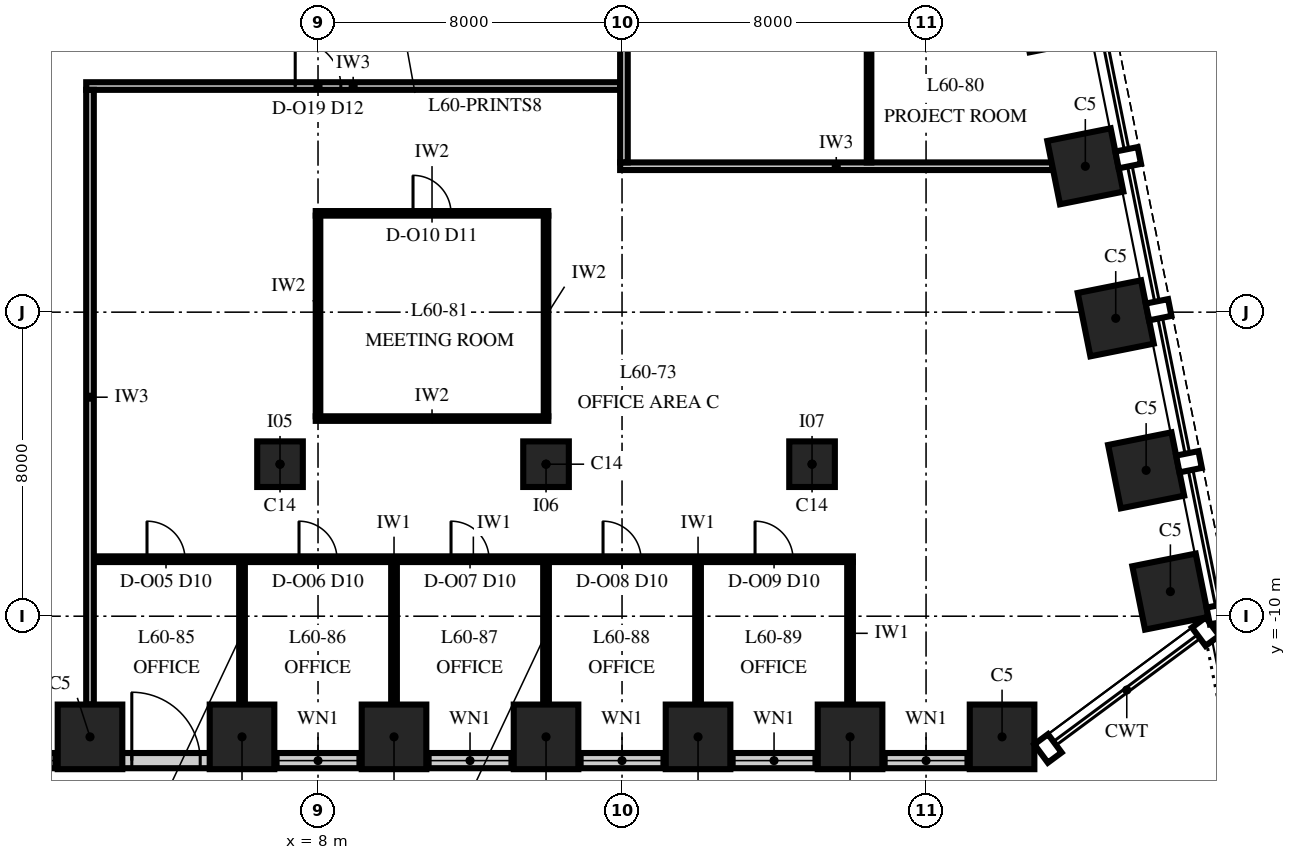
"""IFC4 building model, lengths in metres.
Left out: names, types, materials, properties, quantities, classifications, styles, units other than length and angle.
Written with IfcOpenShell. Run it as: python <this file> out.ifc"""

import sys

from ifc_helpers import new_model, si_unit, direction, frame, frame_2d, origin, origin_2d, place, context, subcontext, project, spatial, rectangle, extrude, element, fill, save


model = new_model("IFC4")
c1 = context("Model", 3, precision=1e-05, world=origin(), true_north=direction((0.0, 1.0)))
c2 = subcontext(c1, "Body", "Model", "MODEL_VIEW")
j1 = project(units=[si_unit("LENGTHUNIT", "METRE"), si_unit("PLANEANGLEUNIT", "RADIAN")], contexts=[c1])
p1 = place(None, origin())
s1 = spatial("IfcSite", under=j1, at=p1, CompositionType="ELEMENT")
p2 = place(p1, origin())
s2 = spatial("IfcBuilding", under=s1, at=p2, CompositionType="ELEMENT")
p3 = place(p2, frame((0.0, 0.0, 260.0)))
s3 = spatial("IfcBuildingStorey", under=s2, at=p3, CompositionType="ELEMENT", Elevation=260.0)
for number, where, z_axis, x_axis in (
    (1, (2.0, -13.175, -0.25), (0.0, 0.0, 1.0), (1.0, 0.0, 0.0)),
    (2, (6.0, -13.175, -0.25), (0.0, 0.0, 1.0), (1.0, 0.0, 0.0)),
    (3, (10.0, -13.175, -0.25), (0.0, 0.0, 1.0), (1.0, 0.0, 0.0)),
    (4, (14.0, -13.175, -0.25), (0.0, 0.0, 1.0), (1.0, 0.0, 0.0)),
    (5, (18.0, -13.175, -0.25), (0.0, 0.0, 1.0), (1.0, 0.0, 0.0)),
    (6, (22.0, -13.175, -0.25), (0.0, 0.0, 1.0), (1.0, 0.0, 0.0)),
    (7, (26.0, -13.175, -0.25), (0.0, 0.0, 1.0), (1.0, 0.0, 0.0)),
):
    element("IfcColumn", number, at=place(p3, frame(where, z_axis=z_axis, x_axis=x_axis)), inside=s3, PredefinedType="COLUMN", context=c2, shape_type="SweptSolid", body=[
        extrude(rectangle(XDim=1.7, YDim=1.7, at=origin_2d()), origin(), (0.0, 0.0, 1.0), 4.25),
    ])
for number, where, z_axis, x_axis in (
    (8, (30.429, -9.353, 0.0), (0.0, 0.0, 1.0), (-0.196, 0.981, 0.0)),
    (9, (29.791, -6.162, 0.0), (0.0, 0.0, 1.0), (-0.196, 0.981, 0.0)),
    (10, (28.991, -2.162, 0.0), (0.0, 0.0, 1.0), (-0.196, 0.981, 0.0)),
    (11, (28.191, 1.838, 0.0), (0.0, 0.0, 1.0), (-0.196, 0.981, 0.0)),
    (12, (27.391, 5.838, 0.0), (0.0, 0.0, 1.0), (-0.196, 0.981, 0.0)),
):
    element("IfcColumn", number, at=place(p3, frame(where, z_axis=z_axis, x_axis=x_axis)), inside=s3, PredefinedType="COLUMN", context=c2, shape_type="SweptSolid", body=[
        extrude(rectangle(XDim=1.7, YDim=1.7, at=origin_2d()), origin(), (0.0, 0.0, 1.0), 4.0),
    ])
for number, where, z_axis, x_axis in (
    (13, (7.0, -6.0, 0.0), (0.0, 0.0, 1.0), (1.0, 0.0, 0.0)),
    (14, (14.0, -6.0, 0.0), (0.0, 0.0, 1.0), (1.0, 0.0, 0.0)),
    (15, (21.0, -6.0, 0.0), (0.0, 0.0, 1.0), (1.0, 0.0, 0.0)),
):
    element("IfcColumn", number, at=place(p3, frame(where, z_axis=z_axis, x_axis=x_axis)), inside=s3, PredefinedType="COLUMN", context=c2, shape_type="SweptSolid", body=[
        extrude(rectangle(XDim=1.2, YDim=1.2, at=origin_2d()), origin(), (0.0, 0.0, 1.0), 4.0),
    ])
p4 = place(p3, frame((-26.0, -13.8, 0.0), z_axis=(0.0, 0.0, 1.0), x_axis=(1.0, 0.0, 0.0)))
e16 = element("IfcWall", 16, at=p4, inside=s3, PredefinedType="SOLIDWALL", context=c2, shape_type="SweptSolid", body=[
    extrude(rectangle(XDim=52.0, YDim=0.4, at=frame_2d((26.0, 0.0))), origin(), (0.0, 0.0, 1.0), 2.0),
])
p5 = place(p4, frame((0.95, 0.0, 0.8)))
e17 = element("IfcOpeningElement", 17, at=p5, cuts=e16, PredefinedType="OPENING", context=c2, shape_type="SweptSolid", body=[
    extrude(rectangle(XDim=2.1, YDim=1.15, at=frame_2d((1.05, 0.575))), frame((0.0, 0.215, 0.0), z_axis=(0.0, -1.0, 0.0), x_axis=(1.0, 0.0, 0.0)), (0.0, 0.0, 1.0), 0.43),
])
p6 = place(p4, frame((4.95, 0.0, 0.8)))
e18 = element("IfcOpeningElement", 18, at=p6, cuts=e16, PredefinedType="OPENING", context=c2, shape_type="SweptSolid", body=[
    extrude(rectangle(XDim=2.1, YDim=1.15, at=frame_2d((1.05, 0.575))), frame((0.0, 0.215, 0.0), z_axis=(0.0, -1.0, 0.0), x_axis=(1.0, 0.0, 0.0)), (0.0, 0.0, 1.0), 0.43),
])
p7 = place(p4, frame((8.95, 0.0, 0.8)))
e19 = element("IfcOpeningElement", 19, at=p7, cuts=e16, PredefinedType="OPENING", context=c2, shape_type="SweptSolid", body=[
    extrude(rectangle(XDim=2.1, YDim=1.15, at=frame_2d((1.05, 0.575))), frame((0.0, 0.215, 0.0), z_axis=(0.0, -1.0, 0.0), x_axis=(1.0, 0.0, 0.0)), (0.0, 0.0, 1.0), 0.43),
])
p8 = place(p4, frame((12.95, 0.0, 0.8)))
e20 = element("IfcOpeningElement", 20, at=p8, cuts=e16, PredefinedType="OPENING", context=c2, shape_type="SweptSolid", body=[
    extrude(rectangle(XDim=2.1, YDim=1.15, at=frame_2d((1.05, 0.575))), frame((0.0, 0.215, 0.0), z_axis=(0.0, -1.0, 0.0), x_axis=(1.0, 0.0, 0.0)), (0.0, 0.0, 1.0), 0.43),
])
p9 = place(p4, frame((16.95, 0.0, 0.8)))
e21 = element("IfcOpeningElement", 21, at=p9, cuts=e16, PredefinedType="OPENING", context=c2, shape_type="SweptSolid", body=[
    extrude(rectangle(XDim=2.1, YDim=1.15, at=frame_2d((1.05, 0.575))), frame((0.0, 0.215, 0.0), z_axis=(0.0, -1.0, 0.0), x_axis=(1.0, 0.0, 0.0)), (0.0, 0.0, 1.0), 0.43),
])
p10 = place(p4, frame((21.1, 0.0, 0.0)))
e22 = element("IfcOpeningElement", 22, at=p10, cuts=e16, PredefinedType="OPENING", context=c2, shape_type="SweptSolid", body=[
    extrude(rectangle(XDim=1.8, YDim=2.0, at=frame_2d((0.9, 1.0))), frame((0.0, 0.215, 0.0), z_axis=(0.0, -1.0, 0.0), x_axis=(1.0, 0.0, 0.0)), (0.0, 0.0, 1.0), 0.43),
])
p11 = place(p4, frame((24.95, 0.0, 0.8)))
e23 = element("IfcOpeningElement", 23, at=p11, cuts=e16, PredefinedType="OPENING", context=c2, shape_type="SweptSolid", body=[
    extrude(rectangle(XDim=2.1, YDim=1.15, at=frame_2d((1.05, 0.575))), frame((0.0, 0.215, 0.0), z_axis=(0.0, -1.0, 0.0), x_axis=(1.0, 0.0, 0.0)), (0.0, 0.0, 1.0), 0.43),
])
p12 = place(p4, frame((29.1, 0.0, 0.0)))
e24 = element("IfcOpeningElement", 24, at=p12, cuts=e16, PredefinedType="OPENING", context=c2, shape_type="SweptSolid", body=[
    extrude(rectangle(XDim=1.8, YDim=2.0, at=frame_2d((0.9, 1.0))), frame((0.0, 0.215, 0.0), z_axis=(0.0, -1.0, 0.0), x_axis=(1.0, 0.0, 0.0)), (0.0, 0.0, 1.0), 0.43),
])
p13 = place(p4, frame((32.95, 0.0, 0.8)))
e25 = element("IfcOpeningElement", 25, at=p13, cuts=e16, PredefinedType="OPENING", context=c2, shape_type="SweptSolid", body=[
    extrude(rectangle(XDim=2.1, YDim=1.15, at=frame_2d((1.05, 0.575))), frame((0.0, 0.215, 0.0), z_axis=(0.0, -1.0, 0.0), x_axis=(1.0, 0.0, 0.0)), (0.0, 0.0, 1.0), 0.43),
])
p14 = place(p4, frame((36.95, 0.0, 0.8)))
e26 = element("IfcOpeningElement", 26, at=p14, cuts=e16, PredefinedType="OPENING", context=c2, shape_type="SweptSolid", body=[
    extrude(rectangle(XDim=2.1, YDim=1.15, at=frame_2d((1.05, 0.575))), frame((0.0, 0.215, 0.0), z_axis=(0.0, -1.0, 0.0), x_axis=(1.0, 0.0, 0.0)), (0.0, 0.0, 1.0), 0.43),
])
p15 = place(p4, frame((40.95, 0.0, 0.8)))
e27 = element("IfcOpeningElement", 27, at=p15, cuts=e16, PredefinedType="OPENING", context=c2, shape_type="SweptSolid", body=[
    extrude(rectangle(XDim=2.1, YDim=1.15, at=frame_2d((1.05, 0.575))), frame((0.0, 0.215, 0.0), z_axis=(0.0, -1.0, 0.0), x_axis=(1.0, 0.0, 0.0)), (0.0, 0.0, 1.0), 0.43),
])
p16 = place(p4, frame((44.95, 0.0, 0.8)))
e28 = element("IfcOpeningElement", 28, at=p16, cuts=e16, PredefinedType="OPENING", context=c2, shape_type="SweptSolid", body=[
    extrude(rectangle(XDim=2.1, YDim=1.15, at=frame_2d((1.05, 0.575))), frame((0.0, 0.215, 0.0), z_axis=(0.0, -1.0, 0.0), x_axis=(1.0, 0.0, 0.0)), (0.0, 0.0, 1.0), 0.43),
])
p17 = place(p4, frame((48.95, 0.0, 0.8)))
e29 = element("IfcOpeningElement", 29, at=p17, cuts=e16, PredefinedType="OPENING", context=c2, shape_type="SweptSolid", body=[
    extrude(rectangle(XDim=2.1, YDim=1.15, at=frame_2d((1.05, 0.575))), frame((0.0, 0.215, 0.0), z_axis=(0.0, -1.0, 0.0), x_axis=(1.0, 0.0, 0.0)), (0.0, 0.0, 1.0), 0.43),
])
p18 = place(p3, frame((2.1, -8.5, 0.0), z_axis=(0.0, 0.0, 1.0), x_axis=(1.0, 0.0, 0.0)))
e30 = element("IfcWall", 30, at=p18, inside=s3, PredefinedType="PARTITIONING", context=c2, shape_type="SweptSolid", body=[
    extrude(rectangle(XDim=19.975, YDim=0.15, at=frame_2d((9.987, 0.0))), origin(), (0.0, 0.0, 1.0), 3.23),
])
p19 = place(p18, frame((1.4, 0.0, 0.0)))
e31 = element("IfcOpeningElement", 31, at=p19, cuts=e30, PredefinedType="OPENING", context=c2, shape_type="SweptSolid", body=[
    extrude(rectangle(XDim=1.0, YDim=2.3, at=frame_2d((0.5, 1.15))), frame((0.0, 0.09, 0.0), z_axis=(0.0, -1.0, 0.0), x_axis=(1.0, 0.0, 0.0)), (0.0, 0.0, 1.0), 0.18),
])
p20 = place(p18, frame((5.4, 0.0, 0.0)))
e32 = element("IfcOpeningElement", 32, at=p20, cuts=e30, PredefinedType="OPENING", context=c2, shape_type="SweptSolid", body=[
    extrude(rectangle(XDim=1.0, YDim=2.3, at=frame_2d((0.5, 1.15))), frame((0.0, 0.09, 0.0), z_axis=(0.0, -1.0, 0.0), x_axis=(1.0, 0.0, 0.0)), (0.0, 0.0, 1.0), 0.18),
])
p21 = place(p18, frame((9.4, 0.0, 0.0)))
e33 = element("IfcOpeningElement", 33, at=p21, cuts=e30, PredefinedType="OPENING", context=c2, shape_type="SweptSolid", body=[
    extrude(rectangle(XDim=1.0, YDim=2.3, at=frame_2d((0.5, 1.15))), frame((0.0, 0.09, 0.0), z_axis=(0.0, -1.0, 0.0), x_axis=(1.0, 0.0, 0.0)), (0.0, 0.0, 1.0), 0.18),
])
p22 = place(p18, frame((13.4, 0.0, 0.0)))
e34 = element("IfcOpeningElement", 34, at=p22, cuts=e30, PredefinedType="OPENING", context=c2, shape_type="SweptSolid", body=[
    extrude(rectangle(XDim=1.0, YDim=2.3, at=frame_2d((0.5, 1.15))), frame((0.0, 0.09, 0.0), z_axis=(0.0, -1.0, 0.0), x_axis=(1.0, 0.0, 0.0)), (0.0, 0.0, 1.0), 0.18),
])
p23 = place(p18, frame((17.4, 0.0, 0.0)))
e35 = element("IfcOpeningElement", 35, at=p23, cuts=e30, PredefinedType="OPENING", context=c2, shape_type="SweptSolid", body=[
    extrude(rectangle(XDim=1.0, YDim=2.3, at=frame_2d((0.5, 1.15))), frame((0.0, 0.09, 0.0), z_axis=(0.0, -1.0, 0.0), x_axis=(1.0, 0.0, 0.0)), (0.0, 0.0, 1.0), 0.18),
])
p24 = place(p3, frame((7.94, -4.8, 0.0), z_axis=(0.0, 0.0, 1.0), x_axis=(1.0, 0.0, 0.0)))
e36 = element("IfcWall", 36, at=p24, inside=s3, PredefinedType="PARTITIONING", context=c2, shape_type="SweptSolid", body=[
    extrude(rectangle(XDim=6.12, YDim=0.12, at=frame_2d((3.06, 0.0))), origin(), (0.0, 0.0, 1.0), 3.23),
])
p25 = place(p3, frame((7.94, 0.6, 0.0), z_axis=(0.0, 0.0, 1.0), x_axis=(1.0, 0.0, 0.0)))
e37 = element("IfcWall", 37, at=p25, inside=s3, PredefinedType="PARTITIONING", context=c2, shape_type="SweptSolid", body=[
    extrude(rectangle(XDim=6.12, YDim=0.12, at=frame_2d((3.06, 0.0))), origin(), (0.0, 0.0, 1.0), 3.23),
])
p26 = place(p25, frame((2.56, 0.0, 0.0)))
e38 = element("IfcOpeningElement", 38, at=p26, cuts=e37, PredefinedType="OPENING", context=c2, shape_type="SweptSolid", body=[
    extrude(rectangle(XDim=1.0, YDim=2.4, at=frame_2d((0.5, 1.2))), frame((0.0, 0.075, 0.0), z_axis=(0.0, -1.0, 0.0), x_axis=(1.0, 0.0, 0.0)), (0.0, 0.0, 1.0), 0.15),
])
p27 = place(p3, frame((15.95, 1.84, 0.0), z_axis=(0.0, 0.0, 1.0), x_axis=(1.0, 0.0, 0.0)))
e39 = element("IfcWall", 39, at=p27, inside=s3, PredefinedType="PARTITIONING", context=c2, shape_type="SweptSolid", body=[
    extrude(rectangle(XDim=11.374, YDim=0.2, at=frame_2d((5.687, 0.0))), origin(), (0.0, 0.0, 1.0), 3.23),
])
p28 = place(p3, frame((1.9, 3.95, 0.0), z_axis=(0.0, 0.0, 1.0), x_axis=(1.0, 0.0, 0.0)))
e40 = element("IfcWall", 40, at=p28, inside=s3, PredefinedType="PARTITIONING", context=c2, shape_type="SweptSolid", body=[
    extrude(rectangle(XDim=14.05, YDim=0.2, at=frame_2d((7.025, 0.0))), origin(), (0.0, 0.0, 1.0), 3.23),
])
p29 = place(p28, frame((5.5, 0.0, 0.0)))
e41 = element("IfcOpeningElement", 41, at=p29, cuts=e40, PredefinedType="OPENING", context=c2, shape_type="SweptSolid", body=[
    extrude(rectangle(XDim=1.2, YDim=2.4, at=frame_2d((0.6, 1.2))), frame((0.0, 0.115, 0.0), z_axis=(0.0, -1.0, 0.0), x_axis=(1.0, 0.0, 0.0)), (0.0, 0.0, 1.0), 0.23),
])
p30 = place(p3, frame((2.0, -12.325, 0.0), z_axis=(0.0, 0.0, 1.0), x_axis=(0.0, 1.0, 0.0)))
e42 = element("IfcWall", 42, at=p30, inside=s3, PredefinedType="PARTITIONING", context=c2, shape_type="SweptSolid", body=[
    extrude(rectangle(XDim=16.175, YDim=0.2, at=frame_2d((8.087, 0.0))), origin(), (0.0, 0.0, 1.0), 2.842),
])
p31 = place(p3, frame((6.0, -12.325, 0.0), z_axis=(0.0, 0.0, 1.0), x_axis=(0.0, 1.0, 0.0)))
e43 = element("IfcWall", 43, at=p31, inside=s3, PredefinedType="PARTITIONING", context=c2, shape_type="SweptSolid", body=[
    extrude(rectangle(XDim=3.75, YDim=0.15, at=frame_2d((1.875, 0.0))), origin(), (0.0, 0.0, 1.0), 3.23),
])
p32 = place(p3, frame((8.0, -4.74, 0.0), z_axis=(0.0, 0.0, 1.0), x_axis=(0.0, 1.0, 0.0)))
e44 = element("IfcWall", 44, at=p32, inside=s3, PredefinedType="PARTITIONING", context=c2, shape_type="SweptSolid", body=[
    extrude(rectangle(XDim=5.28, YDim=0.12, at=frame_2d((2.64, 0.0))), origin(), (0.0, 0.0, 1.0), 3.85),
])
for number, where, z_axis, x_axis in (
    (45, (10.0, -12.325, 0.0), (0.0, 0.0, 1.0), (0.0, 1.0, 0.0)),
    (46, (14.0, -12.325, 0.0), (0.0, 0.0, 1.0), (0.0, 1.0, 0.0)),
):
    element("IfcWall", number, at=place(p3, frame(where, z_axis=z_axis, x_axis=x_axis)), inside=s3, PredefinedType="PARTITIONING", context=c2, shape_type="SweptSolid", body=[
        extrude(rectangle(XDim=3.75, YDim=0.15, at=frame_2d((1.875, 0.0))), origin(), (0.0, 0.0, 1.0), 3.23),
    ])
p33 = place(p3, frame((14.0, -4.74, 0.0), z_axis=(0.0, 0.0, 1.0), x_axis=(0.0, 1.0, 0.0)))
e47 = element("IfcWall", 47, at=p33, inside=s3, PredefinedType="PARTITIONING", context=c2, shape_type="SweptSolid", body=[
    extrude(rectangle(XDim=5.28, YDim=0.12, at=frame_2d((2.64, 0.0))), origin(), (0.0, 0.0, 1.0), 3.23),
])
p34 = place(p3, frame((16.05, 1.94, 0.0), z_axis=(0.0, 0.0, 1.0), x_axis=(0.0, 1.0, 0.0)))
e48 = element("IfcWall", 48, at=p34, inside=s3, PredefinedType="PARTITIONING", context=c2, shape_type="SweptSolid", body=[
    extrude(rectangle(XDim=24.01, YDim=0.2, at=frame_2d((12.005, 0.0))), origin(), (0.0, 0.0, 1.0), 2.842),
])
p35 = place(p34, frame((8.46, 0.0, 0.0)))
e49 = element("IfcOpeningElement", 49, at=p35, cuts=e48, PredefinedType="OPENING", context=c2, shape_type="SweptSolid", body=[
    extrude(rectangle(XDim=1.2, YDim=2.4, at=frame_2d((0.6, 1.2))), frame((0.0, 0.115, 0.0), z_axis=(0.0, -1.0, 0.0), x_axis=(1.0, 0.0, 0.0)), (0.0, 0.0, 1.0), 0.23),
])
p36 = place(p34, frame((22.46, 0.0, 0.0)))
e50 = element("IfcOpeningElement", 50, at=p36, cuts=e48, PredefinedType="OPENING", context=c2, shape_type="SweptSolid", body=[
    extrude(rectangle(XDim=1.2, YDim=2.4, at=frame_2d((0.6, 1.2))), frame((0.0, 0.115, 0.0), z_axis=(0.0, -1.0, 0.0), x_axis=(1.0, 0.0, 0.0)), (0.0, 0.0, 1.0), 0.23),
])
for number, where, z_axis, x_axis in (
    (51, (18.0, -12.325, 0.0), (0.0, 0.0, 1.0), (0.0, 1.0, 0.0)),
    (52, (22.0, -12.325, 0.0), (0.0, 0.0, 1.0), (0.0, 1.0, 0.0)),
):
    element("IfcWall", number, at=place(p3, frame(where, z_axis=z_axis, x_axis=x_axis)), inside=s3, PredefinedType="PARTITIONING", context=c2, shape_type="SweptSolid", body=[
        extrude(rectangle(XDim=3.75, YDim=0.15, at=frame_2d((1.875, 0.0))), origin(), (0.0, 0.0, 1.0), 3.23),
    ])
p37 = place(p3, frame((22.5, 1.94, 0.0), z_axis=(0.0, 0.0, 1.0), x_axis=(0.0, 1.0, 0.0)))
e53 = element("IfcWall", 53, at=p37, inside=s3, PredefinedType="PARTITIONING", context=c2, shape_type="SweptSolid", body=[
    extrude(rectangle(XDim=7.825, YDim=0.12, at=frame_2d((3.913, 0.0))), origin(), (0.0, 0.0, 1.0), 2.842),
])
p38 = place(p37, frame((3.4, 0.0, 0.0)))
e54 = element("IfcOpeningElement", 54, at=p38, cuts=e53, PredefinedType="OPENING", context=c2, shape_type="SweptSolid", body=[
    extrude(rectangle(XDim=1.0, YDim=2.4, at=frame_2d((0.5, 1.2))), frame((0.0, 0.075, 0.0), z_axis=(0.0, -1.0, 0.0), x_axis=(1.0, 0.0, 0.0)), (0.0, 0.0, 1.0), 0.15),
])
p39 = place(p11, origin())
e55 = element("IfcWindow", 55, at=p39, inside=s3, PartitioningType="SINGLE_PANEL", PredefinedType="WINDOW", context=c2, shape_type="SweptSolid", body=[
    extrude(rectangle(XDim=2.1, YDim=1.15, at=frame_2d((1.05, 0.575))), frame((0.0, 0.03, 0.0), z_axis=(0.0, -1.0, 0.0), x_axis=(1.0, 0.0, 0.0)), (0.0, 0.0, 1.0), 0.06),
])
fill(e23, e55)
p40 = place(p12, origin())
e56 = element("IfcDoor", 56, at=p40, inside=s3, OperationType="DOUBLE_DOOR_SINGLE_SWING", PredefinedType="DOOR", context=c2, shape_type="SweptSolid", body=[
    extrude(rectangle(XDim=1.8, YDim=2.0, at=frame_2d((0.9, 1.0))), frame((0.0, 0.2, 0.0), z_axis=(0.0, -1.0, 0.0), x_axis=(1.0, 0.0, 0.0)), (0.0, 0.0, 1.0), 0.399),
])
fill(e24, e56)
p41 = place(p13, origin())
e57 = element("IfcWindow", 57, at=p41, inside=s3, PartitioningType="SINGLE_PANEL", PredefinedType="WINDOW", context=c2, shape_type="SweptSolid", body=[
    extrude(rectangle(XDim=2.1, YDim=1.15, at=frame_2d((1.05, 0.575))), frame((0.0, 0.03, 0.0), z_axis=(0.0, -1.0, 0.0), x_axis=(1.0, 0.0, 0.0)), (0.0, 0.0, 1.0), 0.06),
])
fill(e25, e57)
p42 = place(p14, origin())
e58 = element("IfcWindow", 58, at=p42, inside=s3, PartitioningType="SINGLE_PANEL", PredefinedType="WINDOW", context=c2, shape_type="SweptSolid", body=[
    extrude(rectangle(XDim=2.1, YDim=1.15, at=frame_2d((1.05, 0.575))), frame((0.0, 0.03, 0.0), z_axis=(0.0, -1.0, 0.0), x_axis=(1.0, 0.0, 0.0)), (0.0, 0.0, 1.0), 0.06),
])
fill(e26, e58)
p43 = place(p15, origin())
e59 = element("IfcWindow", 59, at=p43, inside=s3, PartitioningType="SINGLE_PANEL", PredefinedType="WINDOW", context=c2, shape_type="SweptSolid", body=[
    extrude(rectangle(XDim=2.1, YDim=1.15, at=frame_2d((1.05, 0.575))), frame((0.0, 0.03, 0.0), z_axis=(0.0, -1.0, 0.0), x_axis=(1.0, 0.0, 0.0)), (0.0, 0.0, 1.0), 0.06),
])
fill(e27, e59)
p44 = place(p16, origin())
e60 = element("IfcWindow", 60, at=p44, inside=s3, PartitioningType="SINGLE_PANEL", PredefinedType="WINDOW", context=c2, shape_type="SweptSolid", body=[
    extrude(rectangle(XDim=2.1, YDim=1.15, at=frame_2d((1.05, 0.575))), frame((0.0, 0.03, 0.0), z_axis=(0.0, -1.0, 0.0), x_axis=(1.0, 0.0, 0.0)), (0.0, 0.0, 1.0), 0.06),
])
fill(e28, e60)
p45 = place(p17, origin())
e61 = element("IfcWindow", 61, at=p45, inside=s3, PartitioningType="SINGLE_PANEL", PredefinedType="WINDOW", context=c2, shape_type="SweptSolid", body=[
    extrude(rectangle(XDim=2.1, YDim=1.15, at=frame_2d((1.05, 0.575))), frame((0.0, 0.03, 0.0), z_axis=(0.0, -1.0, 0.0), x_axis=(1.0, 0.0, 0.0)), (0.0, 0.0, 1.0), 0.06),
])
fill(e29, e61)
p46 = place(p19, origin())
e62 = element("IfcDoor", 62, at=p46, inside=s3, OperationType="SINGLE_SWING_LEFT", PredefinedType="DOOR", context=c2, shape_type="SweptSolid", body=[
    extrude(rectangle(XDim=1.0, YDim=2.3, at=frame_2d((0.5, 1.15))), frame((0.0, 0.075, 0.0), z_axis=(0.0, -1.0, 0.0), x_axis=(1.0, 0.0, 0.0)), (0.0, 0.0, 1.0), 0.149),
])
fill(e31, e62)
p47 = place(p20, origin())
e63 = element("IfcDoor", 63, at=p47, inside=s3, OperationType="SINGLE_SWING_LEFT", PredefinedType="DOOR", context=c2, shape_type="SweptSolid", body=[
    extrude(rectangle(XDim=1.0, YDim=2.3, at=frame_2d((0.5, 1.15))), frame((0.0, 0.075, 0.0), z_axis=(0.0, -1.0, 0.0), x_axis=(1.0, 0.0, 0.0)), (0.0, 0.0, 1.0), 0.149),
])
fill(e32, e63)
p48 = place(p21, origin())
e64 = element("IfcDoor", 64, at=p48, inside=s3, OperationType="SINGLE_SWING_LEFT", PredefinedType="DOOR", context=c2, shape_type="SweptSolid", body=[
    extrude(rectangle(XDim=1.0, YDim=2.3, at=frame_2d((0.5, 1.15))), frame((0.0, 0.075, 0.0), z_axis=(0.0, -1.0, 0.0), x_axis=(1.0, 0.0, 0.0)), (0.0, 0.0, 1.0), 0.149),
])
fill(e33, e64)
p49 = place(p22, origin())
e65 = element("IfcDoor", 65, at=p49, inside=s3, OperationType="SINGLE_SWING_LEFT", PredefinedType="DOOR", context=c2, shape_type="SweptSolid", body=[
    extrude(rectangle(XDim=1.0, YDim=2.3, at=frame_2d((0.5, 1.15))), frame((0.0, 0.075, 0.0), z_axis=(0.0, -1.0, 0.0), x_axis=(1.0, 0.0, 0.0)), (0.0, 0.0, 1.0), 0.149),
])
fill(e34, e65)
p50 = place(p23, origin())
e66 = element("IfcDoor", 66, at=p50, inside=s3, OperationType="SINGLE_SWING_LEFT", PredefinedType="DOOR", context=c2, shape_type="SweptSolid", body=[
    extrude(rectangle(XDim=1.0, YDim=2.3, at=frame_2d((0.5, 1.15))), frame((0.0, 0.075, 0.0), z_axis=(0.0, -1.0, 0.0), x_axis=(1.0, 0.0, 0.0)), (0.0, 0.0, 1.0), 0.149),
])
fill(e35, e66)
p51 = place(p26, origin())
e67 = element("IfcDoor", 67, at=p51, inside=s3, OperationType="SINGLE_SWING_RIGHT", PredefinedType="DOOR", context=c2, shape_type="SweptSolid", body=[
    extrude(rectangle(XDim=1.0, YDim=2.4, at=frame_2d((0.5, 1.2))), frame((0.0, 0.06, 0.0), z_axis=(0.0, -1.0, 0.0), x_axis=(1.0, 0.0, 0.0)), (0.0, 0.0, 1.0), 0.12),
])
fill(e38, e67)
p52 = place(p29, origin())
e68 = element("IfcDoor", 68, at=p52, inside=s3, OperationType="SINGLE_SWING_LEFT", PredefinedType="DOOR", context=c2, shape_type="SweptSolid", body=[
    extrude(rectangle(XDim=1.2, YDim=2.4, at=frame_2d((0.6, 1.2))), frame((0.0, 0.1, 0.0), z_axis=(0.0, -1.0, 0.0), x_axis=(1.0, 0.0, 0.0)), (0.0, 0.0, 1.0), 0.199),
])
fill(e41, e68)
save(model, sys.argv[1])
